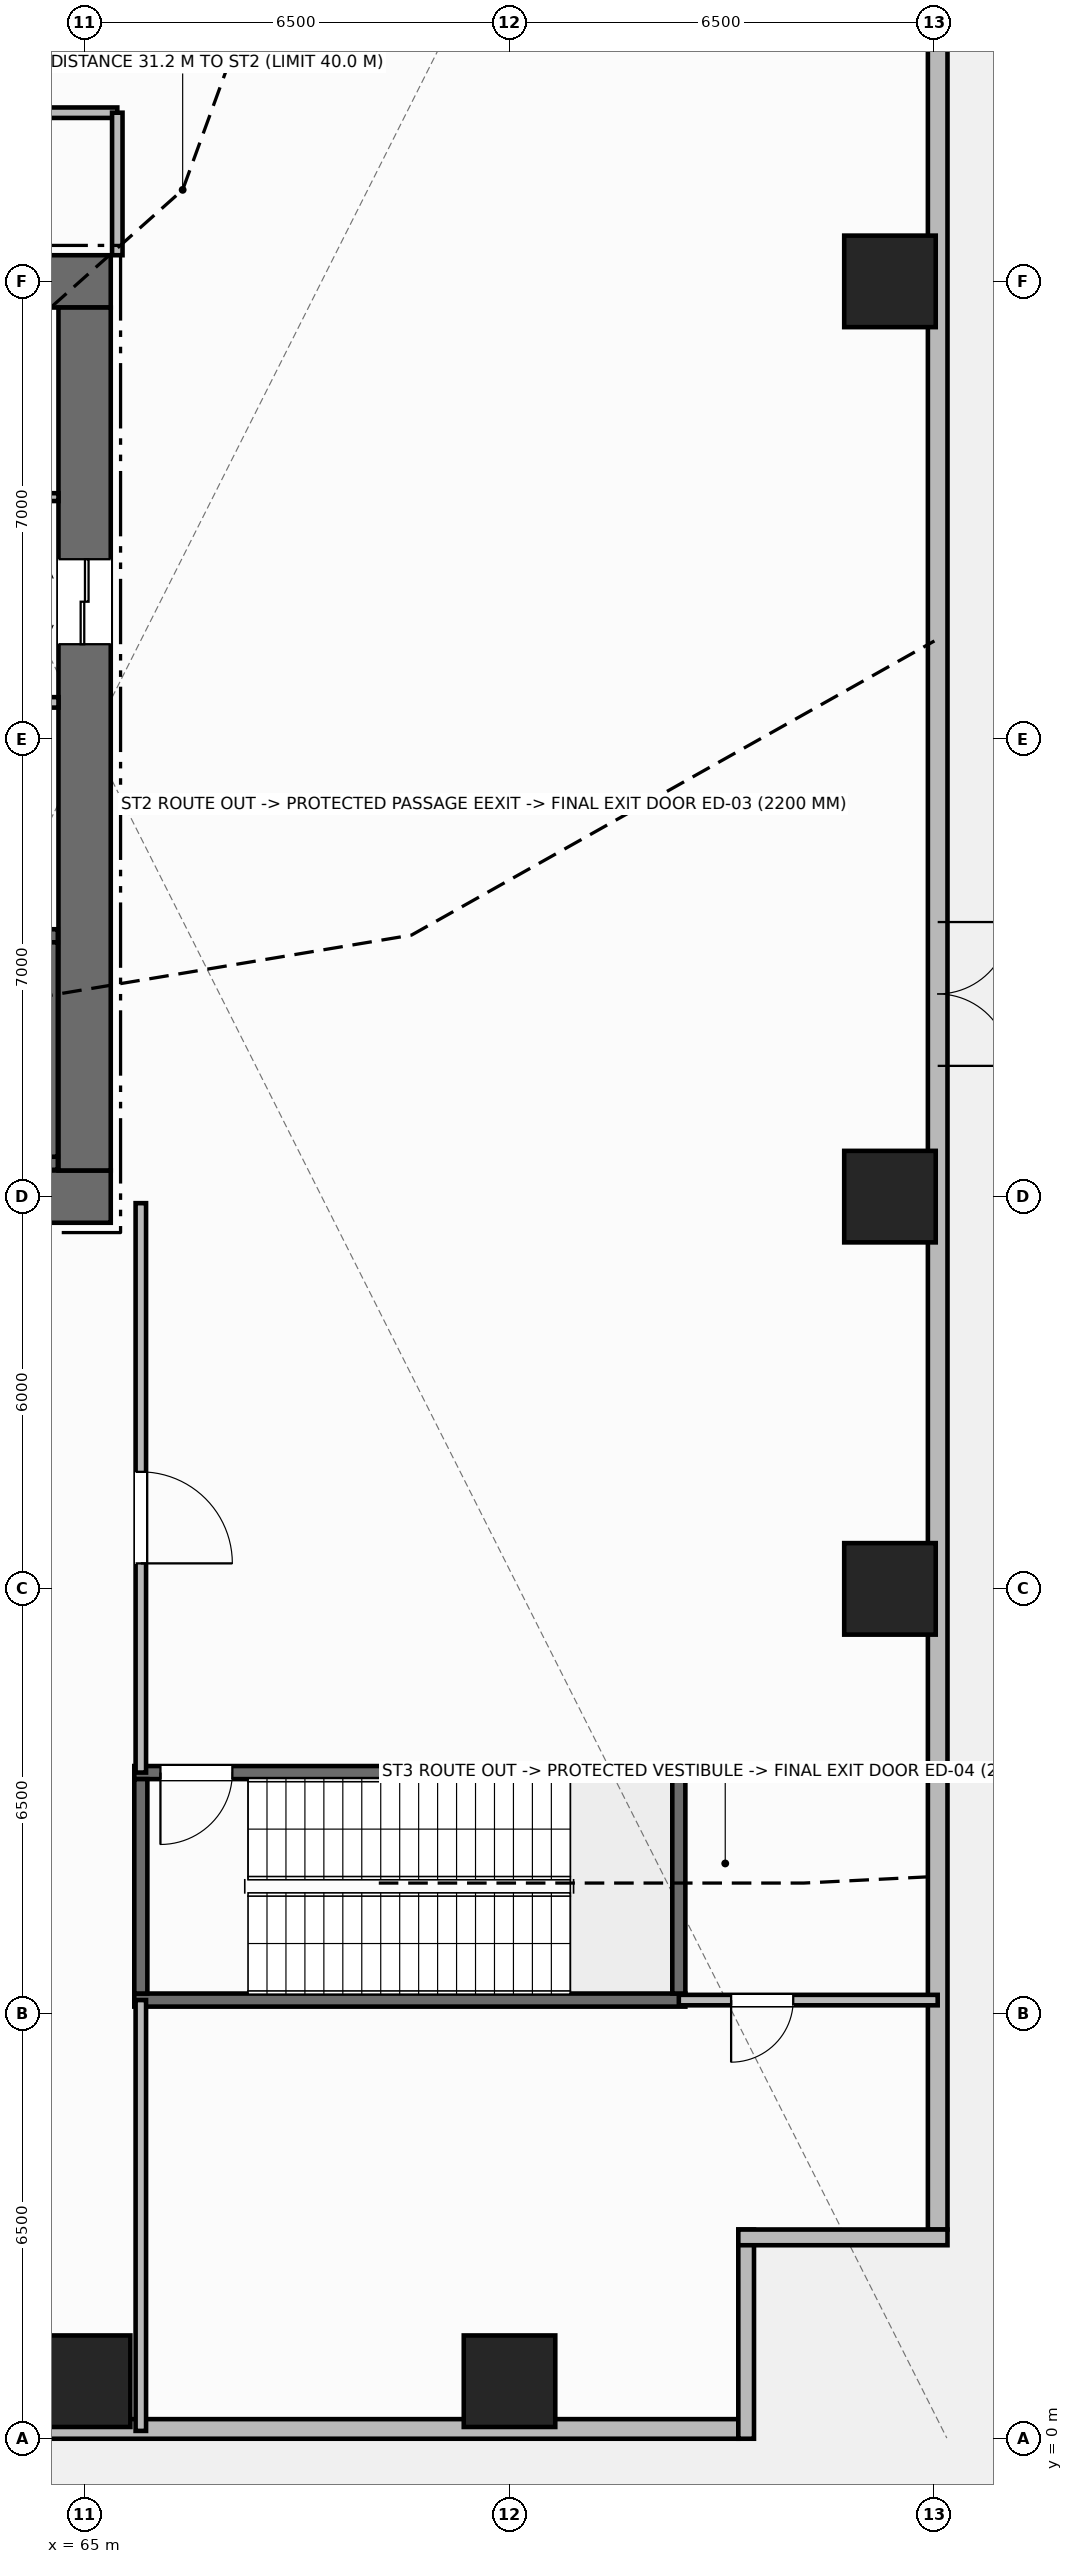
"""IFC4 building model, lengths in metres.
Left out: names, types, materials, properties, quantities, classifications, styles, units other than length and angle.
Written with IfcOpenShell. Run it as: python <this file> out.ifc"""

import sys

from ifc_helpers import new_model, si_unit, direction, frame, frame_2d, origin, origin_2d, place, context, subcontext, project, spatial, rectangle, extrude, element, fill, save


model = new_model("IFC4")
c1 = context("Model", 3, precision=1e-05, world=origin(), true_north=direction((0.0, 1.0)))
c2 = subcontext(c1, "Body", "Model", "MODEL_VIEW")
j1 = project(units=[si_unit("LENGTHUNIT", "METRE"), si_unit("PLANEANGLEUNIT", "RADIAN")], contexts=[c1])
p1 = place(None, origin())
s1 = spatial("IfcSite", under=j1, at=p1, CompositionType="ELEMENT")
p2 = place(p1, origin())
s2 = spatial("IfcBuilding", under=s1, at=p2, CompositionType="ELEMENT")
p3 = place(p2, origin())
s3 = spatial("IfcBuildingStorey", under=s2, at=p3, CompositionType="ELEMENT", Elevation=0.0)
p4 = place(p3, frame((51.6, 19.0, 0.0), z_axis=(0.0, 0.0, 1.0), x_axis=(1.0, 0.0, 0.0)))
e1 = element("IfcWall", 1, at=p4, inside=s3, PredefinedType="SHEAR", context=c2, shape_type="SweptSolid", body=[
    extrude(rectangle(XDim=13.8, YDim=0.8, at=frame_2d((6.9, 0.0))), origin(), (0.0, 0.0, 1.0), 6.0),
])
p5 = place(p4, frame((3.12, 0.0, 0.0)))
e2 = element("IfcOpeningElement", 2, at=p5, cuts=e1, PredefinedType="OPENING", context=c2, shape_type="SweptSolid", body=[
    extrude(rectangle(XDim=1.4, YDim=2.2, at=frame_2d((0.7, 1.1))), frame((0.0, 0.41, 0.0), z_axis=(0.0, -1.0, 0.0), x_axis=(1.0, 0.0, 0.0)), (0.0, 0.0, 1.0), 0.82),
])
p6 = place(p3, frame((51.6, 33.0, 0.0), z_axis=(0.0, 0.0, 1.0), x_axis=(1.0, 0.0, 0.0)))
e3 = element("IfcWall", 3, at=p6, inside=s3, PredefinedType="SHEAR", context=c2, shape_type="SweptSolid", body=[
    extrude(rectangle(XDim=13.8, YDim=0.8, at=frame_2d((6.9, 0.0))), origin(), (0.0, 0.0, 1.0), 6.0),
])
p7 = place(p6, frame((3.12, 0.0, 0.0)))
e4 = element("IfcOpeningElement", 4, at=p7, cuts=e3, PredefinedType="OPENING", context=c2, shape_type="SweptSolid", body=[
    extrude(rectangle(XDim=1.4, YDim=2.2, at=frame_2d((0.7, 1.1))), frame((0.0, 0.41, 0.0), z_axis=(0.0, -1.0, 0.0), x_axis=(1.0, 0.0, 0.0)), (0.0, 0.0, 1.0), 0.82),
])
p8 = place(p6, frame((11.0, 0.0, 0.0)))
e5 = element("IfcOpeningElement", 5, at=p8, cuts=e3, PredefinedType="OPENING", context=c2, shape_type="SweptSolid", body=[
    extrude(rectangle(XDim=0.9, YDim=2.15, at=frame_2d((0.45, 1.075))), frame((0.0, 0.41, 0.0), z_axis=(0.0, -1.0, 0.0), x_axis=(1.0, 0.0, 0.0)), (0.0, 0.0, 1.0), 0.82),
])
p9 = place(p6, frame((6.4, 0.0, 0.0)))
e6 = element("IfcOpeningElement", 6, at=p9, cuts=e3, PredefinedType="OPENING", context=c2, shape_type="SweptSolid", body=[
    extrude(rectangle(XDim=0.95, YDim=2.15, at=frame_2d((0.475, 1.075))), frame((0.0, 0.41, 0.0), z_axis=(0.0, -1.0, 0.0), x_axis=(1.0, 0.0, 0.0)), (0.0, 0.0, 1.0), 0.82),
])
p10 = place(p6, frame((8.85, 0.0, 0.0)))
e7 = element("IfcOpeningElement", 7, at=p10, cuts=e3, PredefinedType="OPENING", context=c2, shape_type="SweptSolid", body=[
    extrude(rectangle(XDim=0.9, YDim=2.15, at=frame_2d((0.45, 1.075))), frame((0.0, 0.41, 0.0), z_axis=(0.0, -1.0, 0.0), x_axis=(1.0, 0.0, 0.0)), (0.0, 0.0, 1.0), 0.82),
])
p11 = place(p3, frame((65.0, 19.4, 0.0), z_axis=(0.0, 0.0, 1.0), x_axis=(0.0, 1.0, 0.0)))
e8 = element("IfcWall", 8, at=p11, inside=s3, PredefinedType="SHEAR", context=c2, shape_type="SweptSolid", body=[
    extrude(rectangle(XDim=13.2, YDim=0.8, at=frame_2d((6.6, 0.0))), origin(), (0.0, 0.0, 1.0), 6.0),
])
p12 = place(p11, frame((8.05, 0.0, 0.0)))
e9 = element("IfcOpeningElement", 9, at=p12, cuts=e8, PredefinedType="OPENING", context=c2, shape_type="SweptSolid", body=[
    extrude(rectangle(XDim=1.3, YDim=2.2, at=frame_2d((0.65, 1.1))), frame((0.0, 0.41, 0.0), z_axis=(0.0, -1.0, 0.0), x_axis=(1.0, 0.0, 0.0)), (0.0, 0.0, 1.0), 0.82),
])
p13 = place(p3, frame((56.16, 19.51, 0.0), z_axis=(0.0, 0.0, 1.0), x_axis=(1.0, 0.0, 0.0)))
e10 = element("IfcWall", 10, at=p13, inside=s3, PredefinedType="SHEAR", context=c2, shape_type="SweptSolid", body=[
    extrude(rectangle(XDim=8.43, YDim=0.2, at=frame_2d((4.215, 0.0))), origin(), (0.0, 0.0, 1.0), 6.0),
])
p14 = place(p3, frame((56.16, 22.99, 0.0), z_axis=(0.0, 0.0, 1.0), x_axis=(1.0, 0.0, 0.0)))
e11 = element("IfcWall", 11, at=p14, inside=s3, PredefinedType="SHEAR", context=c2, shape_type="SweptSolid", body=[
    extrude(rectangle(XDim=8.43, YDim=0.2, at=frame_2d((4.215, 0.0))), origin(), (0.0, 0.0, 1.0), 6.0),
])
p15 = place(p14, frame((0.45, 0.0, 0.0)))
e12 = element("IfcOpeningElement", 12, at=p15, cuts=e11, PredefinedType="OPENING", context=c2, shape_type="SweptSolid", body=[
    extrude(rectangle(XDim=1.0, YDim=2.15, at=frame_2d((0.5, 1.075))), frame((0.0, 0.11, 0.0), z_axis=(0.0, -1.0, 0.0), x_axis=(1.0, 0.0, 0.0)), (0.0, 0.0, 1.0), 0.22),
])
p16 = place(p3, frame((64.49, 19.61, 0.0), z_axis=(0.0, 0.0, 1.0), x_axis=(0.0, 1.0, 0.0)))
e13 = element("IfcWall", 13, at=p16, inside=s3, PredefinedType="SHEAR", context=c2, shape_type="SweptSolid", body=[
    extrude(rectangle(XDim=3.28, YDim=0.2, at=frame_2d((1.64, 0.0))), origin(), (0.0, 0.0, 1.0), 6.0),
])
p17 = place(p3, frame((65.76, 6.71, 0.0), z_axis=(0.0, 0.0, 1.0), x_axis=(1.0, 0.0, 0.0)))
e14 = element("IfcWall", 14, at=p17, inside=s3, PredefinedType="SHEAR", context=c2, shape_type="SweptSolid", body=[
    extrude(rectangle(XDim=8.43, YDim=0.2, at=frame_2d((4.215, 0.0))), origin(), (0.0, 0.0, 1.0), 6.0),
])
p18 = place(p3, frame((65.76, 10.19, 0.0), z_axis=(0.0, 0.0, 1.0), x_axis=(1.0, 0.0, 0.0)))
e15 = element("IfcWall", 15, at=p18, inside=s3, PredefinedType="SHEAR", context=c2, shape_type="SweptSolid", body=[
    extrude(rectangle(XDim=8.43, YDim=0.2, at=frame_2d((4.215, 0.0))), origin(), (0.0, 0.0, 1.0), 6.0),
])
p19 = place(p18, frame((0.4, 0.0, 0.0)))
e16 = element("IfcOpeningElement", 16, at=p19, cuts=e15, PredefinedType="OPENING", context=c2, shape_type="SweptSolid", body=[
    extrude(rectangle(XDim=1.1, YDim=2.15, at=frame_2d((0.55, 1.075))), frame((0.0, 0.11, 0.0), z_axis=(0.0, -1.0, 0.0), x_axis=(1.0, 0.0, 0.0)), (0.0, 0.0, 1.0), 0.22),
])
for number, where, z_axis, x_axis in (
    (17, (65.86, 6.81, 0.0), (0.0, 0.0, 1.0), (0.0, 1.0, 0.0)),
    (18, (74.09, 6.81, 0.0), (0.0, 0.0, 1.0), (0.0, 1.0, 0.0)),
):
    element("IfcWall", number, at=place(p3, frame(where, z_axis=z_axis, x_axis=x_axis)), inside=s3, PredefinedType="SHEAR", context=c2, shape_type="SweptSolid", body=[
        extrude(rectangle(XDim=3.28, YDim=0.2, at=frame_2d((1.64, 0.0))), origin(), (0.0, 0.0, 1.0), 6.0),
    ])
for number, where, z_axis, x_axis in (
    (19, (65.0, 0.88, 0.0), (0.0, 0.0, 1.0), (1.0, 0.0, 0.0)),
    (20, (71.5, 0.88, 0.0), (0.0, 0.0, 1.0), (1.0, 0.0, 0.0)),
    (21, (77.32, 13.0, 0.0), (0.0, 0.0, 1.0), (1.0, 0.0, 0.0)),
    (22, (77.32, 19.0, 0.0), (0.0, 0.0, 1.0), (1.0, 0.0, 0.0)),
    (23, (77.32, 33.0, 0.0), (0.0, 0.0, 1.0), (1.0, 0.0, 0.0)),
):
    element("IfcColumn", number, at=place(p3, frame(where, z_axis=z_axis, x_axis=x_axis)), inside=s3, PredefinedType="COLUMN", context=c2, shape_type="SweptSolid", body=[
        extrude(rectangle(XDim=1.4, YDim=1.4, at=origin_2d()), origin(), (0.0, 0.0, 1.0), 6.0),
    ])
p20 = place(p3, frame((75.0, 0.15, 0.0), z_axis=(0.0, 0.0, 1.0), x_axis=(-1.0, 0.0, 0.0)))
e24 = element("IfcWall", 24, at=p20, inside=s3, PredefinedType="STANDARD", context=c2, shape_type="SweptSolid", body=[
    extrude(rectangle(XDim=23.0, YDim=0.3, at=frame_2d((11.5, 0.0))), origin(), (0.0, 0.0, 1.0), 5.72),
])
p21 = place(p20, frame((12.0, 0.0, 0.0)))
e25 = element("IfcOpeningElement", 25, at=p21, cuts=e24, PredefinedType="OPENING", context=c2, shape_type="SweptSolid", body=[
    extrude(rectangle(XDim=2.2, YDim=2.4, at=frame_2d((1.1, 1.2))), frame((0.0, 0.16, 0.0), z_axis=(0.0, -1.0, 0.0), x_axis=(1.0, 0.0, 0.0)), (0.0, 0.0, 1.0), 0.32),
])
p22 = place(p3, frame((78.05, 48.8, 0.0), z_axis=(0.0, 0.0, 1.0), x_axis=(0.0, -1.0, 0.0)))
e26 = element("IfcWall", 26, at=p22, inside=s3, PredefinedType="STANDARD", context=c2, shape_type="SweptSolid", body=[
    extrude(rectangle(XDim=45.6, YDim=0.3, at=frame_2d((22.8, 0.0))), origin(), (0.0, 0.0, 1.0), 5.72),
])
p23 = place(p22, frame((2.6, 0.0, 0.0)))
e27 = element("IfcOpeningElement", 27, at=p23, cuts=e26, PredefinedType="OPENING", context=c2, shape_type="SweptSolid", body=[
    extrude(rectangle(XDim=6.0, YDim=3.2, at=frame_2d((3.0, 1.6))), frame((0.0, 0.16, 0.0), z_axis=(0.0, -1.0, 0.0), x_axis=(1.0, 0.0, 0.0)), (0.0, 0.0, 1.0), 0.32),
])
p24 = place(p22, frame((25.6, 0.0, 0.0)))
e28 = element("IfcOpeningElement", 28, at=p24, cuts=e26, PredefinedType="OPENING", context=c2, shape_type="SweptSolid", body=[
    extrude(rectangle(XDim=2.2, YDim=2.4, at=frame_2d((1.1, 1.2))), frame((0.0, 0.16, 0.0), z_axis=(0.0, -1.0, 0.0), x_axis=(1.0, 0.0, 0.0)), (0.0, 0.0, 1.0), 0.32),
])
for number, where, z_axis, x_axis in (
    (29, (75.12, 3.2, 0.0), (0.0, 0.0, 1.0), (0.0, -1.0, 0.0)),
    (30, (78.2, 3.08, 0.0), (0.0, 0.0, 1.0), (-1.0, 0.0, 0.0)),
):
    element("IfcWall", number, at=place(p3, frame(where, z_axis=z_axis, x_axis=x_axis)), inside=s3, PredefinedType="STANDARD", context=c2, shape_type="SweptSolid", body=[
        extrude(rectangle(XDim=3.2, YDim=0.24, at=frame_2d((1.6, 0.0))), origin(), (0.0, 0.0, 1.0), 5.72),
    ])
p25 = place(p3, frame((56.26, 26.56, 0.0), z_axis=(0.0, 0.0, 1.0), x_axis=(1.0, 0.0, 0.0)))
e31 = element("IfcWall", 31, at=p25, inside=s3, PredefinedType="STANDARD", context=c2, shape_type="SweptSolid", body=[
    extrude(rectangle(XDim=8.34, YDim=0.16, at=frame_2d((4.17, 0.0))), origin(), (0.0, 0.0, 1.0), 5.72),
])
p26 = place(p3, frame((61.87, 29.7, 0.0), z_axis=(0.0, 0.0, 1.0), x_axis=(1.0, 0.0, 0.0)))
e32 = element("IfcWall", 32, at=p26, inside=s3, PredefinedType="PARTITIONING", context=c2, shape_type="SweptSolid", body=[
    extrude(rectangle(XDim=2.73, YDim=0.12, at=frame_2d((1.365, 0.0))), origin(), (0.0, 0.0, 1.0), 5.72),
])
p27 = place(p3, frame((65.86, 0.12, 0.0), z_axis=(0.0, 0.0, 1.0), x_axis=(0.0, 1.0, 0.0)))
e33 = element("IfcWall", 33, at=p27, inside=s3, PredefinedType="STANDARD", context=c2, shape_type="SweptSolid", body=[
    extrude(rectangle(XDim=6.59, YDim=0.16, at=frame_2d((3.295, 0.0))), origin(), (0.0, 0.0, 1.0), 5.72),
])
p28 = place(p3, frame((55.58, 35.58, 0.0), z_axis=(0.0, 0.0, 1.0), x_axis=(1.0, 0.0, 0.0)))
e34 = element("IfcWall", 34, at=p28, inside=s3, PredefinedType="STANDARD", context=c2, shape_type="SweptSolid", body=[
    extrude(rectangle(XDim=9.92, YDim=0.16, at=frame_2d((4.96, 0.0))), origin(), (0.0, 0.0, 1.0), 5.72),
])
p29 = place(p28, frame((1.1, 0.0, 0.0)))
e35 = element("IfcOpeningElement", 35, at=p29, cuts=e34, PredefinedType="OPENING", context=c2, shape_type="SweptSolid", body=[
    extrude(rectangle(XDim=0.9, YDim=2.15, at=frame_2d((0.45, 1.075))), frame((0.0, 0.09, 0.0), z_axis=(0.0, -1.0, 0.0), x_axis=(1.0, 0.0, 0.0)), (0.0, 0.0, 1.0), 0.18),
])
p30 = place(p28, frame((5.9, 0.0, 0.0)))
e36 = element("IfcOpeningElement", 36, at=p30, cuts=e34, PredefinedType="OPENING", context=c2, shape_type="SweptSolid", body=[
    extrude(rectangle(XDim=1.1, YDim=2.15, at=frame_2d((0.55, 1.075))), frame((0.0, 0.09, 0.0), z_axis=(0.0, -1.0, 0.0), x_axis=(1.0, 0.0, 0.0)), (0.0, 0.0, 1.0), 0.18),
])
p31 = place(p3, frame((65.5, 33.4, 0.0), z_axis=(0.0, 0.0, 1.0), x_axis=(0.0, 1.0, 0.0)))
e37 = element("IfcWall", 37, at=p31, inside=s3, PredefinedType="STANDARD", context=c2, shape_type="SweptSolid", body=[
    extrude(rectangle(XDim=2.18, YDim=0.16, at=frame_2d((1.09, 0.0))), origin(), (0.0, 0.0, 1.0), 5.72),
])
p32 = place(p3, frame((74.09, 6.71, 0.0), z_axis=(0.0, 0.0, 1.0), x_axis=(1.0, 0.0, 0.0)))
e38 = element("IfcWall", 38, at=p32, inside=s3, PredefinedType="STANDARD", context=c2, shape_type="SweptSolid", body=[
    extrude(rectangle(XDim=3.96, YDim=0.16, at=frame_2d((1.98, 0.0))), origin(), (0.0, 0.0, 1.0), 5.72),
])
p33 = place(p32, frame((0.8, 0.0, 0.0)))
e39 = element("IfcOpeningElement", 39, at=p33, cuts=e38, PredefinedType="OPENING", context=c2, shape_type="SweptSolid", body=[
    extrude(rectangle(XDim=0.95, YDim=2.15, at=frame_2d((0.475, 1.075))), frame((0.0, 0.09, 0.0), z_axis=(0.0, -1.0, 0.0), x_axis=(1.0, 0.0, 0.0)), (0.0, 0.0, 1.0), 0.18),
])
p34 = place(p3, frame((65.86, 10.19, 0.0), z_axis=(0.0, 0.0, 1.0), x_axis=(0.0, 1.0, 0.0)))
e40 = element("IfcWall", 40, at=p34, inside=s3, PredefinedType="STANDARD", context=c2, shape_type="SweptSolid", body=[
    extrude(rectangle(XDim=8.71, YDim=0.16, at=frame_2d((4.355, 0.0))), origin(), (0.0, 0.0, 1.0), 5.72),
])
p35 = place(p34, frame((3.2, 0.0, 0.0)))
e41 = element("IfcOpeningElement", 41, at=p35, cuts=e40, PredefinedType="OPENING", context=c2, shape_type="SweptSolid", body=[
    extrude(rectangle(XDim=1.4, YDim=2.2, at=frame_2d((0.7, 1.1))), frame((0.0, 0.09, 0.0), z_axis=(0.0, -1.0, 0.0), x_axis=(1.0, 0.0, 0.0)), (0.0, 0.0, 1.0), 0.18),
])
p36 = place(p24, origin())
e42 = element("IfcDoor", 42, at=p36, inside=s3, OperationType="DOUBLE_DOOR_SINGLE_SWING", PredefinedType="DOOR", context=c2, shape_type="SweptSolid", body=[
    extrude(rectangle(XDim=2.2, YDim=2.4, at=frame_2d((1.1, 1.2))), frame((0.0, 0.025, 0.0), z_axis=(0.0, -1.0, 0.0), x_axis=(1.0, 0.0, 0.0)), (0.0, 0.0, 1.0), 0.05),
])
fill(e28, e42)
p37 = place(p12, origin())
e43 = element("IfcDoor", 43, at=p37, inside=s3, OperationType="DOUBLE_DOOR_SLIDING", PredefinedType="DOOR", context=c2, shape_type="SweptSolid", body=[
    extrude(rectangle(XDim=1.3, YDim=2.2, at=frame_2d((0.65, 1.1))), frame((0.0, 0.025, 0.0), z_axis=(0.0, -1.0, 0.0), x_axis=(1.0, 0.0, 0.0)), (0.0, 0.0, 1.0), 0.05),
])
fill(e9, e43)
p38 = place(p19, origin())
e44 = element("IfcDoor", 44, at=p38, inside=s3, OperationType="SINGLE_SWING_RIGHT", PredefinedType="DOOR", context=c2, shape_type="SweptSolid", body=[
    extrude(rectangle(XDim=1.1, YDim=2.15, at=frame_2d((0.55, 1.075))), frame((0.0, 0.025, 0.0), z_axis=(0.0, -1.0, 0.0), x_axis=(1.0, 0.0, 0.0)), (0.0, 0.0, 1.0), 0.05),
])
fill(e16, e44)
p39 = place(p33, origin())
e45 = element("IfcDoor", 45, at=p39, inside=s3, OperationType="SINGLE_SWING_RIGHT", PredefinedType="DOOR", context=c2, shape_type="SweptSolid", body=[
    extrude(rectangle(XDim=0.95, YDim=2.15, at=frame_2d((0.475, 1.075))), frame((0.0, 0.025, 0.0), z_axis=(0.0, -1.0, 0.0), x_axis=(1.0, 0.0, 0.0)), (0.0, 0.0, 1.0), 0.05),
])
fill(e39, e45)
p40 = place(p35, origin())
e46 = element("IfcDoor", 46, at=p40, inside=s3, OperationType="SINGLE_SWING_RIGHT", PredefinedType="DOOR", context=c2, shape_type="SweptSolid", body=[
    extrude(rectangle(XDim=1.4, YDim=2.2, at=frame_2d((0.7, 1.1))), frame((0.0, 0.025, 0.0), z_axis=(0.0, -1.0, 0.0), x_axis=(1.0, 0.0, 0.0)), (0.0, 0.0, 1.0), 0.05),
])
fill(e41, e46)
save(model, sys.argv[1])
